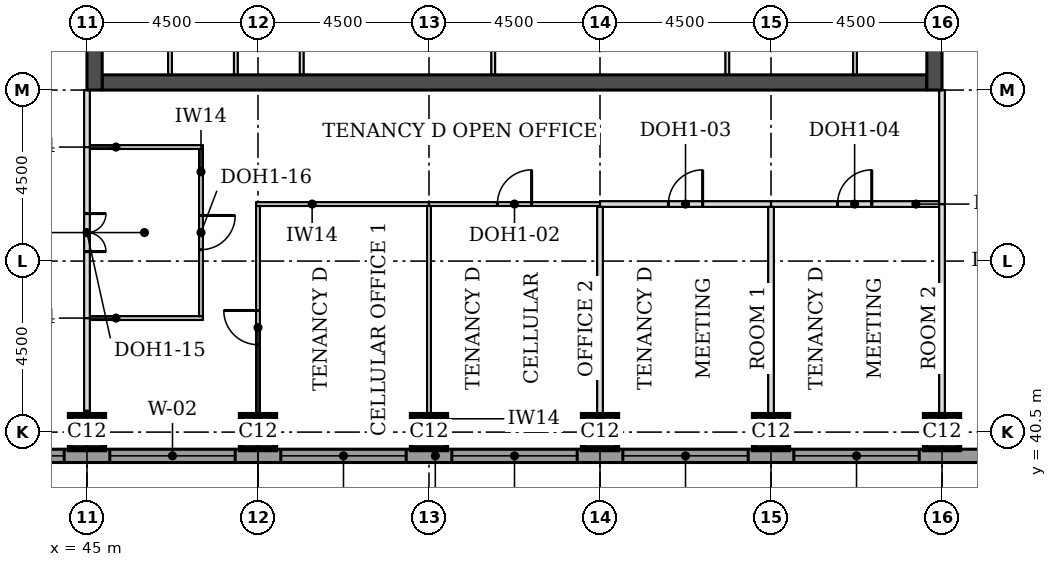
"""IFC4 building model, lengths in metres.
Left out: names, types, materials, properties, quantities, classifications, styles, units other than length and angle.
Written with IfcOpenShell. Run it as: python <this file> out.ifc"""

import sys

from ifc_helpers import new_model, si_unit, direction, frame, frame_2d, origin, origin_2d, place, context, subcontext, project, spatial, rectangle, extrude, element, fill, save


model = new_model("IFC4")
c1 = context("Model", 3, precision=1e-05, world=origin(), true_north=direction((0.0, 1.0)))
c2 = subcontext(c1, "Body", "Model", "MODEL_VIEW")
j1 = project(units=[si_unit("LENGTHUNIT", "METRE"), si_unit("PLANEANGLEUNIT", "RADIAN")], contexts=[c1])
p1 = place(None, origin())
s1 = spatial("IfcSite", under=j1, at=p1, CompositionType="ELEMENT")
p2 = place(p1, origin())
s2 = spatial("IfcBuilding", under=s1, at=p2, CompositionType="ELEMENT")
p3 = place(p2, frame((0.0, 0.0, 147.7)))
s3 = spatial("IfcBuildingStorey", under=s2, at=p3, CompositionType="ELEMENT", Elevation=147.7)
for number, where, z_axis, x_axis in (
    (1, (45.0, 40.5, 0.0), (0.0, 0.0, 1.0), (1.0, 0.0, 0.0)),
    (2, (49.5, 40.5, 0.0), (0.0, 0.0, 1.0), (1.0, 0.0, 0.0)),
    (3, (54.0, 40.5, 0.0), (0.0, 0.0, 1.0), (1.0, 0.0, 0.0)),
    (4, (58.5, 40.5, 0.0), (0.0, 0.0, 1.0), (1.0, 0.0, 0.0)),
    (5, (63.0, 40.5, 0.0), (0.0, 0.0, 1.0), (1.0, 0.0, 0.0)),
    (6, (67.5, 40.5, 0.0), (0.0, 0.0, 1.0), (1.0, 0.0, 0.0)),
):
    element("IfcColumn", number, at=place(p3, frame(where, z_axis=z_axis, x_axis=x_axis)), inside=s3, PredefinedType="COLUMN", context=c2, shape_type="SweptSolid", body=[
        extrude(rectangle(XDim=0.9, YDim=0.9, at=origin_2d()), origin(), (0.0, 0.0, 1.0), 3.7),
    ])
p4 = place(p3, frame((45.4, 49.7, 0.0), z_axis=(0.0, 0.0, 1.0), x_axis=(1.0, 0.0, 0.0)))
e7 = element("IfcWall", 7, at=p4, inside=s3, PredefinedType="SHEAR", context=c2, shape_type="SweptSolid", body=[
    extrude(rectangle(XDim=21.7, YDim=0.4, at=frame_2d((10.85, 0.0))), origin(), (0.0, 0.0, 1.0), 3.7),
])
p5 = place(p3, frame((45.2, 49.5, 0.0), z_axis=(0.0, 0.0, 1.0), x_axis=(0.0, 1.0, 0.0)))
e8 = element("IfcWall", 8, at=p5, inside=s3, PredefinedType="SHEAR", context=c2, shape_type="SweptSolid", body=[
    extrude(rectangle(XDim=22.5, YDim=0.4, at=frame_2d((11.25, 0.0))), origin(), (0.0, 0.0, 1.0), 3.7),
])
p6 = place(p5, frame((4.2, 0.0, 0.0)))
e9 = element("IfcOpeningElement", 9, at=p6, cuts=e8, PredefinedType="OPENING", context=c2, shape_type="SweptSolid", body=[
    extrude(rectangle(XDim=1.8, YDim=2.1, at=frame_2d((0.9, 1.05))), frame((0.0, 0.21, 0.0), z_axis=(0.0, -1.0, 0.0), x_axis=(1.0, 0.0, 0.0)), (0.0, 0.0, 1.0), 0.42),
])
p7 = place(p5, frame((6.9, 0.0, 0.0)))
e10 = element("IfcOpeningElement", 10, at=p7, cuts=e8, PredefinedType="OPENING", context=c2, shape_type="SweptSolid", body=[
    extrude(rectangle(XDim=1.1, YDim=2.1, at=frame_2d((0.55, 1.05))), frame((0.0, 0.21, 0.0), z_axis=(0.0, -1.0, 0.0), x_axis=(1.0, 0.0, 0.0)), (0.0, 0.0, 1.0), 0.42),
])
p8 = place(p5, frame((13.6, 0.0, 0.0)))
e11 = element("IfcOpeningElement", 11, at=p8, cuts=e8, PredefinedType="OPENING", context=c2, shape_type="SweptSolid", body=[
    extrude(rectangle(XDim=1.1, YDim=2.1, at=frame_2d((0.55, 1.05))), frame((0.0, 0.21, 0.0), z_axis=(0.0, -1.0, 0.0), x_axis=(1.0, 0.0, 0.0)), (0.0, 0.0, 1.0), 0.42),
])
p9 = place(p5, frame((16.5, 0.0, 0.0)))
e12 = element("IfcOpeningElement", 12, at=p9, cuts=e8, PredefinedType="OPENING", context=c2, shape_type="SweptSolid", body=[
    extrude(rectangle(XDim=1.8, YDim=2.1, at=frame_2d((0.9, 1.05))), frame((0.0, 0.21, 0.0), z_axis=(0.0, -1.0, 0.0), x_axis=(1.0, 0.0, 0.0)), (0.0, 0.0, 1.0), 0.42),
])
p10 = place(p3, frame((67.3, 49.5, 0.0), z_axis=(0.0, 0.0, 1.0), x_axis=(0.0, 1.0, 0.0)))
e13 = element("IfcWall", 13, at=p10, inside=s3, PredefinedType="SHEAR", context=c2, shape_type="SweptSolid", body=[
    extrude(rectangle(XDim=22.5, YDim=0.4, at=frame_2d((11.25, 0.0))), origin(), (0.0, 0.0, 1.0), 3.7),
])
p11 = place(p10, frame((4.2, 0.0, 0.0)))
e14 = element("IfcOpeningElement", 14, at=p11, cuts=e13, PredefinedType="OPENING", context=c2, shape_type="SweptSolid", body=[
    extrude(rectangle(XDim=1.8, YDim=2.1, at=frame_2d((0.9, 1.05))), frame((0.0, 0.21, 0.0), z_axis=(0.0, -1.0, 0.0), x_axis=(1.0, 0.0, 0.0)), (0.0, 0.0, 1.0), 0.42),
])
p12 = place(p10, frame((6.9, 0.0, 0.0)))
e15 = element("IfcOpeningElement", 15, at=p12, cuts=e13, PredefinedType="OPENING", context=c2, shape_type="SweptSolid", body=[
    extrude(rectangle(XDim=1.1, YDim=2.1, at=frame_2d((0.55, 1.05))), frame((0.0, 0.21, 0.0), z_axis=(0.0, -1.0, 0.0), x_axis=(1.0, 0.0, 0.0)), (0.0, 0.0, 1.0), 0.42),
])
p13 = place(p10, frame((13.6, 0.0, 0.0)))
e16 = element("IfcOpeningElement", 16, at=p13, cuts=e13, PredefinedType="OPENING", context=c2, shape_type="SweptSolid", body=[
    extrude(rectangle(XDim=1.1, YDim=2.1, at=frame_2d((0.55, 1.05))), frame((0.0, 0.21, 0.0), z_axis=(0.0, -1.0, 0.0), x_axis=(1.0, 0.0, 0.0)), (0.0, 0.0, 1.0), 0.42),
])
p14 = place(p10, frame((16.5, 0.0, 0.0)))
e17 = element("IfcOpeningElement", 17, at=p14, cuts=e13, PredefinedType="OPENING", context=c2, shape_type="SweptSolid", body=[
    extrude(rectangle(XDim=1.8, YDim=2.1, at=frame_2d((0.9, 1.05))), frame((0.0, 0.21, 0.0), z_axis=(0.0, -1.0, 0.0), x_axis=(1.0, 0.0, 0.0)), (0.0, 0.0, 1.0), 0.42),
])
p15 = place(p3, frame((36.0, 39.875, 0.0), z_axis=(0.0, 0.0, 1.0), x_axis=(1.0, 0.0, 0.0)))
e18 = element("IfcWall", 18, at=p15, inside=s3, PredefinedType="STANDARD", context=c2, shape_type="SweptSolid", body=[
    extrude(rectangle(XDim=36.331, YDim=0.35, at=frame_2d((18.166, 0.0))), origin(), (0.0, 0.0, 1.0), 3.525),
])
p16 = place(p15, frame((5.1, 0.0, 0.9)))
e19 = element("IfcOpeningElement", 19, at=p16, cuts=e18, PredefinedType="OPENING", context=c2, shape_type="SweptSolid", body=[
    extrude(rectangle(XDim=3.3, YDim=1.9, at=frame_2d((1.65, 0.95))), frame((0.0, 0.185, 0.0), z_axis=(0.0, -1.0, 0.0), x_axis=(1.0, 0.0, 0.0)), (0.0, 0.0, 1.0), 0.37),
])
p17 = place(p15, frame((9.6, 0.0, 0.9)))
e20 = element("IfcOpeningElement", 20, at=p17, cuts=e18, PredefinedType="OPENING", context=c2, shape_type="SweptSolid", body=[
    extrude(rectangle(XDim=3.3, YDim=1.9, at=frame_2d((1.65, 0.95))), frame((0.0, 0.185, 0.0), z_axis=(0.0, -1.0, 0.0), x_axis=(1.0, 0.0, 0.0)), (0.0, 0.0, 1.0), 0.37),
])
p18 = place(p15, frame((14.1, 0.0, 0.9)))
e21 = element("IfcOpeningElement", 21, at=p18, cuts=e18, PredefinedType="OPENING", context=c2, shape_type="SweptSolid", body=[
    extrude(rectangle(XDim=3.3, YDim=1.9, at=frame_2d((1.65, 0.95))), frame((0.0, 0.185, 0.0), z_axis=(0.0, -1.0, 0.0), x_axis=(1.0, 0.0, 0.0)), (0.0, 0.0, 1.0), 0.37),
])
p19 = place(p15, frame((18.6, 0.0, 0.9)))
e22 = element("IfcOpeningElement", 22, at=p19, cuts=e18, PredefinedType="OPENING", context=c2, shape_type="SweptSolid", body=[
    extrude(rectangle(XDim=3.3, YDim=1.9, at=frame_2d((1.65, 0.95))), frame((0.0, 0.185, 0.0), z_axis=(0.0, -1.0, 0.0), x_axis=(1.0, 0.0, 0.0)), (0.0, 0.0, 1.0), 0.37),
])
p20 = place(p15, frame((23.1, 0.0, 0.9)))
e23 = element("IfcOpeningElement", 23, at=p20, cuts=e18, PredefinedType="OPENING", context=c2, shape_type="SweptSolid", body=[
    extrude(rectangle(XDim=3.3, YDim=1.9, at=frame_2d((1.65, 0.95))), frame((0.0, 0.185, 0.0), z_axis=(0.0, -1.0, 0.0), x_axis=(1.0, 0.0, 0.0)), (0.0, 0.0, 1.0), 0.37),
])
p21 = place(p15, frame((27.6, 0.0, 0.9)))
e24 = element("IfcOpeningElement", 24, at=p21, cuts=e18, PredefinedType="OPENING", context=c2, shape_type="SweptSolid", body=[
    extrude(rectangle(XDim=3.3, YDim=1.9, at=frame_2d((1.65, 0.95))), frame((0.0, 0.185, 0.0), z_axis=(0.0, -1.0, 0.0), x_axis=(1.0, 0.0, 0.0)), (0.0, 0.0, 1.0), 0.37),
])
p22 = place(p3, frame((45.075, 43.5, 0.0), z_axis=(0.0, 0.0, 1.0), x_axis=(1.0, 0.0, 0.0)))
e25 = element("IfcWall", 25, at=p22, inside=s3, PredefinedType="PARTITIONING", context=c2, shape_type="SweptSolid", body=[
    extrude(rectangle(XDim=2.975, YDim=0.1, at=frame_2d((1.488, 0.0))), origin(), (0.0, 0.0, 1.0), 3.55),
])
p23 = place(p3, frame((49.45, 46.5, 0.0), z_axis=(0.0, 0.0, 1.0), x_axis=(1.0, 0.0, 0.0)))
e26 = element("IfcWall", 26, at=p23, inside=s3, PredefinedType="PARTITIONING", context=c2, shape_type="SweptSolid", body=[
    extrude(rectangle(XDim=4.55, YDim=0.1, at=frame_2d((2.275, 0.0))), origin(), (0.0, 0.0, 1.0), 3.55),
])
p24 = place(p3, frame((54.0, 46.5, 0.0), z_axis=(0.0, 0.0, 1.0), x_axis=(1.0, 0.0, 0.0)))
e27 = element("IfcWall", 27, at=p24, inside=s3, PredefinedType="PARTITIONING", context=c2, shape_type="SweptSolid", body=[
    extrude(rectangle(XDim=4.5, YDim=0.1, at=frame_2d((2.25, 0.0))), origin(), (0.0, 0.0, 1.0), 3.55),
])
p25 = place(p24, frame((1.8, 0.0, 0.0)))
e28 = element("IfcOpeningElement", 28, at=p25, cuts=e27, PredefinedType="OPENING", context=c2, shape_type="SweptSolid", body=[
    extrude(rectangle(XDim=0.9, YDim=2.1, at=frame_2d((0.45, 1.05))), frame((0.0, 0.06, 0.0), z_axis=(0.0, -1.0, 0.0), x_axis=(1.0, 0.0, 0.0)), (0.0, 0.0, 1.0), 0.12),
])
p26 = place(p3, frame((58.5, 46.5, 0.0), z_axis=(0.0, 0.0, 1.0), x_axis=(1.0, 0.0, 0.0)))
e29 = element("IfcWall", 29, at=p26, inside=s3, PredefinedType="PARTITIONING", context=c2, shape_type="SweptSolid", body=[
    extrude(rectangle(XDim=4.5, YDim=0.15, at=frame_2d((2.25, 0.0))), origin(), (0.0, 0.0, 1.0), 3.55),
])
p27 = place(p26, frame((1.8, 0.0, 0.0)))
e30 = element("IfcOpeningElement", 30, at=p27, cuts=e29, PredefinedType="OPENING", context=c2, shape_type="SweptSolid", body=[
    extrude(rectangle(XDim=0.9, YDim=2.1, at=frame_2d((0.45, 1.05))), frame((0.0, 0.085, 0.0), z_axis=(0.0, -1.0, 0.0), x_axis=(1.0, 0.0, 0.0)), (0.0, 0.0, 1.0), 0.17),
])
p28 = place(p3, frame((63.0, 46.5, 0.0), z_axis=(0.0, 0.0, 1.0), x_axis=(1.0, 0.0, 0.0)))
e31 = element("IfcWall", 31, at=p28, inside=s3, PredefinedType="PARTITIONING", context=c2, shape_type="SweptSolid", body=[
    extrude(rectangle(XDim=4.425, YDim=0.15, at=frame_2d((2.212, 0.0))), origin(), (0.0, 0.0, 1.0), 3.55),
])
p29 = place(p28, frame((1.75, 0.0, 0.0)))
e32 = element("IfcOpeningElement", 32, at=p29, cuts=e31, PredefinedType="OPENING", context=c2, shape_type="SweptSolid", body=[
    extrude(rectangle(XDim=0.9, YDim=2.1, at=frame_2d((0.45, 1.05))), frame((0.0, 0.085, 0.0), z_axis=(0.0, -1.0, 0.0), x_axis=(1.0, 0.0, 0.0)), (0.0, 0.0, 1.0), 0.17),
])
p30 = place(p3, frame((45.075, 48.0, 0.0), z_axis=(0.0, 0.0, 1.0), x_axis=(1.0, 0.0, 0.0)))
e33 = element("IfcWall", 33, at=p30, inside=s3, PredefinedType="PARTITIONING", context=c2, shape_type="SweptSolid", body=[
    extrude(rectangle(XDim=2.975, YDim=0.1, at=frame_2d((1.488, 0.0))), origin(), (0.0, 0.0, 1.0), 3.55),
])
p31 = place(p3, frame((45.0, 40.05, 0.0), z_axis=(0.0, 0.0, 1.0), x_axis=(0.0, 1.0, 0.0)))
e34 = element("IfcWall", 34, at=p31, inside=s3, PredefinedType="PARTITIONING", context=c2, shape_type="SweptSolid", body=[
    extrude(rectangle(XDim=3.45, YDim=0.15, at=frame_2d((1.725, 0.0))), origin(), (0.0, 0.0, 1.0), 3.022),
])
p32 = place(p3, frame((49.5, 40.05, 0.0), z_axis=(0.0, 0.0, 1.0), x_axis=(0.0, 1.0, 0.0)))
e35 = element("IfcWall", 35, at=p32, inside=s3, PredefinedType="PARTITIONING", context=c2, shape_type="SweptSolid", body=[
    extrude(rectangle(XDim=6.4, YDim=0.1, at=frame_2d((3.2, 0.0))), origin(), (0.0, 0.0, 1.0), 3.55),
])
p33 = place(p32, frame((2.75, 0.0, 0.0)))
e36 = element("IfcOpeningElement", 36, at=p33, cuts=e35, PredefinedType="OPENING", context=c2, shape_type="SweptSolid", body=[
    extrude(rectangle(XDim=0.9, YDim=2.1, at=frame_2d((0.45, 1.05))), frame((0.0, 0.06, 0.0), z_axis=(0.0, -1.0, 0.0), x_axis=(1.0, 0.0, 0.0)), (0.0, 0.0, 1.0), 0.12),
])
p34 = place(p3, frame((54.0, 40.05, 0.0), z_axis=(0.0, 0.0, 1.0), x_axis=(0.0, 1.0, 0.0)))
e37 = element("IfcWall", 37, at=p34, inside=s3, PredefinedType="PARTITIONING", context=c2, shape_type="SweptSolid", body=[
    extrude(rectangle(XDim=6.4, YDim=0.1, at=frame_2d((3.2, 0.0))), origin(), (0.0, 0.0, 1.0), 3.55),
])
for number, where, z_axis, x_axis in (
    (38, (58.5, 40.05, 0.0), (0.0, 0.0, 1.0), (0.0, 1.0, 0.0)),
    (39, (63.0, 40.05, 0.0), (0.0, 0.0, 1.0), (0.0, 1.0, 0.0)),
):
    element("IfcWall", number, at=place(p3, frame(where, z_axis=z_axis, x_axis=x_axis)), inside=s3, PredefinedType="PARTITIONING", context=c2, shape_type="SweptSolid", body=[
        extrude(rectangle(XDim=6.375, YDim=0.15, at=frame_2d((3.188, 0.0))), origin(), (0.0, 0.0, 1.0), 3.55),
    ])
p35 = place(p3, frame((67.5, 40.05, 0.0), z_axis=(0.0, 0.0, 1.0), x_axis=(0.0, 1.0, 0.0)))
e40 = element("IfcWall", 40, at=p35, inside=s3, PredefinedType="PARTITIONING", context=c2, shape_type="SweptSolid", body=[
    extrude(rectangle(XDim=6.45, YDim=0.15, at=frame_2d((3.225, 0.0))), origin(), (0.0, 0.0, 1.0), 3.022),
])
p36 = place(p3, frame((45.0, 43.5, 0.0), z_axis=(0.0, 0.0, 1.0), x_axis=(0.0, 1.0, 0.0)))
e41 = element("IfcWall", 41, at=p36, inside=s3, PredefinedType="PARTITIONING", context=c2, shape_type="SweptSolid", body=[
    extrude(rectangle(XDim=4.5, YDim=0.15, at=frame_2d((2.25, 0.0))), origin(), (0.0, 0.0, 1.0), 3.022),
])
p37 = place(p36, frame((1.75, 0.0, 0.0)))
e42 = element("IfcOpeningElement", 42, at=p37, cuts=e41, PredefinedType="OPENING", context=c2, shape_type="SweptSolid", body=[
    extrude(rectangle(XDim=1.0, YDim=2.1, at=frame_2d((0.5, 1.05))), frame((0.0, 0.085, 0.0), z_axis=(0.0, -1.0, 0.0), x_axis=(1.0, 0.0, 0.0)), (0.0, 0.0, 1.0), 0.17),
])
p38 = place(p3, frame((48.0, 43.55, 0.0), z_axis=(0.0, 0.0, 1.0), x_axis=(0.0, 1.0, 0.0)))
e43 = element("IfcWall", 43, at=p38, inside=s3, PredefinedType="PARTITIONING", context=c2, shape_type="SweptSolid", body=[
    extrude(rectangle(XDim=4.4, YDim=0.1, at=frame_2d((2.2, 0.0))), origin(), (0.0, 0.0, 1.0), 3.55),
])
p39 = place(p38, frame((1.75, 0.0, 0.0)))
e44 = element("IfcOpeningElement", 44, at=p39, cuts=e43, PredefinedType="OPENING", context=c2, shape_type="SweptSolid", body=[
    extrude(rectangle(XDim=0.9, YDim=2.1, at=frame_2d((0.45, 1.05))), frame((0.0, 0.06, 0.0), z_axis=(0.0, -1.0, 0.0), x_axis=(1.0, 0.0, 0.0)), (0.0, 0.0, 1.0), 0.12),
])
p40 = place(p3, frame((67.5, 46.5, 0.0), z_axis=(0.0, 0.0, 1.0), x_axis=(0.0, 1.0, 0.0)))
e45 = element("IfcWall", 45, at=p40, inside=s3, PredefinedType="PARTITIONING", context=c2, shape_type="SweptSolid", body=[
    extrude(rectangle(XDim=3.0, YDim=0.15, at=frame_2d((1.5, 0.0))), origin(), (0.0, 0.0, 1.0), 3.022),
])
p41 = place(p3, frame((45.0, 48.0, 0.0), z_axis=(0.0, 0.0, 1.0), x_axis=(0.0, 1.0, 0.0)))
e46 = element("IfcWall", 46, at=p41, inside=s3, PredefinedType="PARTITIONING", context=c2, shape_type="SweptSolid", body=[
    extrude(rectangle(XDim=1.5, YDim=0.15, at=frame_2d((0.75, 0.0))), origin(), (0.0, 0.0, 1.0), 3.022),
])
for number, where, z_axis, x_axis in (
    (47, (47.185, 49.9, 0.0), (0.0, 0.0, 1.0), (0.0, 1.0, 0.0)),
    (48, (48.917, 49.9, 0.0), (0.0, 0.0, 1.0), (0.0, 1.0, 0.0)),
    (49, (50.65, 49.9, 0.0), (0.0, 0.0, 1.0), (0.0, 1.0, 0.0)),
    (50, (55.69, 49.9, 0.0), (0.0, 0.0, 1.0), (0.0, 1.0, 0.0)),
    (51, (61.85, 49.9, 0.0), (0.0, 0.0, 1.0), (0.0, 1.0, 0.0)),
    (52, (65.21, 49.9, 0.0), (0.0, 0.0, 1.0), (0.0, 1.0, 0.0)),
):
    element("IfcWall", number, at=place(p3, frame(where, z_axis=z_axis, x_axis=x_axis)), inside=s3, PredefinedType="PARTITIONING", context=c2, shape_type="SweptSolid", body=[
        extrude(rectangle(XDim=3.1, YDim=0.1, at=frame_2d((1.55, 0.0))), origin(), (0.0, 0.0, 1.0), 3.55),
    ])
p42 = place(p16, origin())
e53 = element("IfcWindow", 53, at=p42, inside=s3, PartitioningType="SINGLE_PANEL", PredefinedType="WINDOW", context=c2, shape_type="SweptSolid", body=[
    extrude(rectangle(XDim=3.3, YDim=1.9, at=frame_2d((1.65, 0.95))), frame((0.0, 0.085, 0.0), z_axis=(0.0, -1.0, 0.0), x_axis=(1.0, 0.0, 0.0)), (0.0, 0.0, 1.0), 0.06),
])
fill(e19, e53)
p43 = place(p17, origin())
e54 = element("IfcWindow", 54, at=p43, inside=s3, PartitioningType="SINGLE_PANEL", PredefinedType="WINDOW", context=c2, shape_type="SweptSolid", body=[
    extrude(rectangle(XDim=3.3, YDim=1.9, at=frame_2d((1.65, 0.95))), frame((0.0, 0.085, 0.0), z_axis=(0.0, -1.0, 0.0), x_axis=(1.0, 0.0, 0.0)), (0.0, 0.0, 1.0), 0.06),
])
fill(e20, e54)
p44 = place(p18, origin())
e55 = element("IfcWindow", 55, at=p44, inside=s3, PartitioningType="SINGLE_PANEL", PredefinedType="WINDOW", context=c2, shape_type="SweptSolid", body=[
    extrude(rectangle(XDim=3.3, YDim=1.9, at=frame_2d((1.65, 0.95))), frame((0.0, 0.085, 0.0), z_axis=(0.0, -1.0, 0.0), x_axis=(1.0, 0.0, 0.0)), (0.0, 0.0, 1.0), 0.06),
])
fill(e21, e55)
p45 = place(p19, origin())
e56 = element("IfcWindow", 56, at=p45, inside=s3, PartitioningType="SINGLE_PANEL", PredefinedType="WINDOW", context=c2, shape_type="SweptSolid", body=[
    extrude(rectangle(XDim=3.3, YDim=1.9, at=frame_2d((1.65, 0.95))), frame((0.0, 0.085, 0.0), z_axis=(0.0, -1.0, 0.0), x_axis=(1.0, 0.0, 0.0)), (0.0, 0.0, 1.0), 0.06),
])
fill(e22, e56)
p46 = place(p20, origin())
e57 = element("IfcWindow", 57, at=p46, inside=s3, PartitioningType="SINGLE_PANEL", PredefinedType="WINDOW", context=c2, shape_type="SweptSolid", body=[
    extrude(rectangle(XDim=3.3, YDim=1.9, at=frame_2d((1.65, 0.95))), frame((0.0, 0.085, 0.0), z_axis=(0.0, -1.0, 0.0), x_axis=(1.0, 0.0, 0.0)), (0.0, 0.0, 1.0), 0.06),
])
fill(e23, e57)
p47 = place(p21, origin())
e58 = element("IfcWindow", 58, at=p47, inside=s3, PartitioningType="SINGLE_PANEL", PredefinedType="WINDOW", context=c2, shape_type="SweptSolid", body=[
    extrude(rectangle(XDim=3.3, YDim=1.9, at=frame_2d((1.65, 0.95))), frame((0.0, 0.085, 0.0), z_axis=(0.0, -1.0, 0.0), x_axis=(1.0, 0.0, 0.0)), (0.0, 0.0, 1.0), 0.06),
])
fill(e24, e58)
p48 = place(p37, frame((1.0, 0.0, 0.0), z_axis=(0.0, 0.0, 1.0), x_axis=(-1.0, 0.0, 0.0)))
e59 = element("IfcDoor", 59, at=p48, inside=s3, OperationType="DOUBLE_DOOR_SINGLE_SWING", PredefinedType="DOOR", context=c2, shape_type="SweptSolid", body=[
    extrude(rectangle(XDim=1.0, YDim=2.1, at=frame_2d((0.5, 1.05))), frame((0.0, 0.025, 0.0), z_axis=(0.0, -1.0, 0.0), x_axis=(1.0, 0.0, 0.0)), (0.0, 0.0, 1.0), 0.05),
])
fill(e42, e59)
p49 = place(p39, frame((0.9, 0.0, 0.0), z_axis=(0.0, 0.0, 1.0), x_axis=(-1.0, 0.0, 0.0)))
e60 = element("IfcDoor", 60, at=p49, inside=s3, OperationType="SINGLE_SWING_LEFT", PredefinedType="DOOR", context=c2, shape_type="SweptSolid", body=[
    extrude(rectangle(XDim=0.9, YDim=2.1, at=frame_2d((0.45, 1.05))), frame((0.0, 0.025, 0.0), z_axis=(0.0, -1.0, 0.0), x_axis=(1.0, 0.0, 0.0)), (0.0, 0.0, 1.0), 0.05),
])
fill(e44, e60)
p50 = place(p33, origin())
e61 = element("IfcDoor", 61, at=p50, inside=s3, OperationType="SINGLE_SWING_RIGHT", PredefinedType="DOOR", context=c2, shape_type="SweptSolid", body=[
    extrude(rectangle(XDim=0.9, YDim=2.1, at=frame_2d((0.45, 1.05))), frame((0.0, 0.025, 0.0), z_axis=(0.0, -1.0, 0.0), x_axis=(1.0, 0.0, 0.0)), (0.0, 0.0, 1.0), 0.05),
])
fill(e36, e61)
p51 = place(p25, origin())
e62 = element("IfcDoor", 62, at=p51, inside=s3, OperationType="SINGLE_SWING_RIGHT", PredefinedType="DOOR", context=c2, shape_type="SweptSolid", body=[
    extrude(rectangle(XDim=0.9, YDim=2.1, at=frame_2d((0.45, 1.05))), frame((0.0, 0.025, 0.0), z_axis=(0.0, -1.0, 0.0), x_axis=(1.0, 0.0, 0.0)), (0.0, 0.0, 1.0), 0.05),
])
fill(e28, e62)
p52 = place(p27, origin())
e63 = element("IfcDoor", 63, at=p52, inside=s3, OperationType="SINGLE_SWING_RIGHT", PredefinedType="DOOR", context=c2, shape_type="SweptSolid", body=[
    extrude(rectangle(XDim=0.9, YDim=2.1, at=frame_2d((0.45, 1.05))), frame((0.0, 0.025, 0.0), z_axis=(0.0, -1.0, 0.0), x_axis=(1.0, 0.0, 0.0)), (0.0, 0.0, 1.0), 0.05),
])
fill(e30, e63)
p53 = place(p29, origin())
e64 = element("IfcDoor", 64, at=p53, inside=s3, OperationType="SINGLE_SWING_RIGHT", PredefinedType="DOOR", context=c2, shape_type="SweptSolid", body=[
    extrude(rectangle(XDim=0.9, YDim=2.1, at=frame_2d((0.45, 1.05))), frame((0.0, 0.025, 0.0), z_axis=(0.0, -1.0, 0.0), x_axis=(1.0, 0.0, 0.0)), (0.0, 0.0, 1.0), 0.05),
])
fill(e32, e64)
save(model, sys.argv[1])
